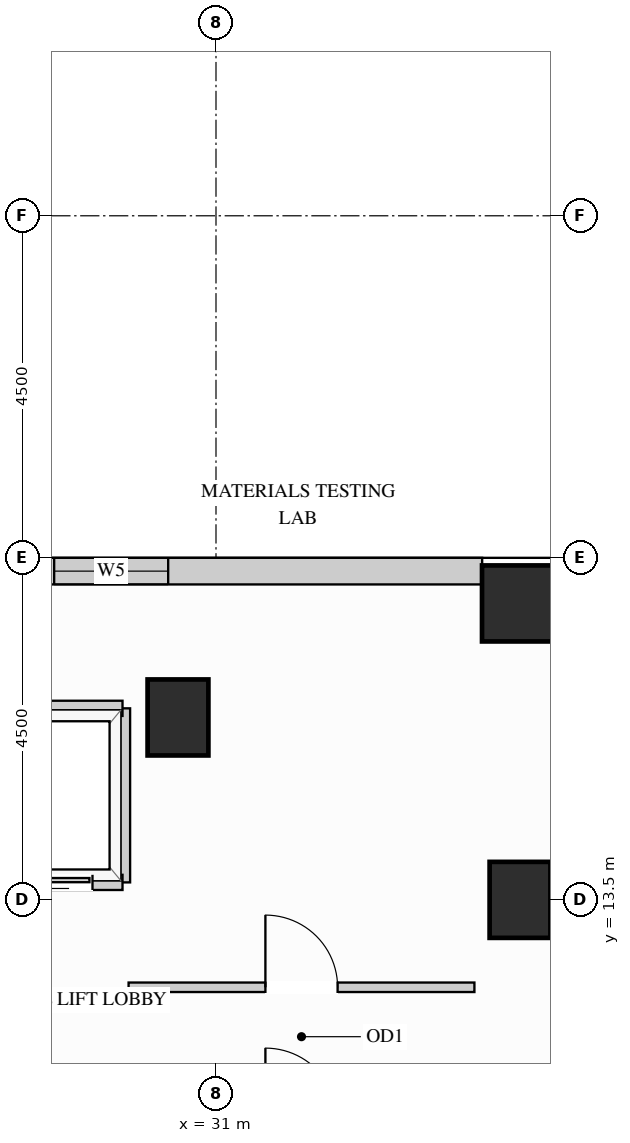
"""IFC4 building model, lengths in metres.
Left out: names, types, materials, properties, quantities, classifications, styles, units other than length and angle.
Written with IfcOpenShell. Run it as: python <this file> out.ifc"""

import sys

from ifc_helpers import new_model, si_unit, direction, frame, frame_2d, origin, origin_2d, place, context, subcontext, project, spatial, rectangle, extrude, source, transform, mapped, element, fill, save


model = new_model("IFC4")
c1 = context("Model", 3, precision=1e-05, world=origin(), true_north=direction((0.0, 1.0)))
c2 = subcontext(c1, "Body", "Model", "MODEL_VIEW")
j1 = project(units=[si_unit("LENGTHUNIT", "METRE"), si_unit("PLANEANGLEUNIT", "RADIAN")], contexts=[c1])
p1 = place(None, origin())
s1 = spatial("IfcSite", under=j1, at=p1, CompositionType="ELEMENT")
p2 = place(p1, origin())
s2 = spatial("IfcBuilding", under=s1, at=p2, CompositionType="ELEMENT")
p3 = place(p2, frame((0.0, 0.0, 186.3)))
s3 = spatial("IfcBuildingStorey", under=s2, at=p3, CompositionType="ELEMENT", Elevation=186.3)
m1 = source(origin(), c2, "Body", "SweptSolid", [
    extrude(rectangle(XDim=0.8, YDim=1.0, at=origin_2d()), origin(), (0.0, 0.0, 1.0), 3.4),
])
for number, where, z_axis, x_axis in (
    (1, (35.0, 13.5, 0.0), (0.0, 0.0, 1.0), (1.0, 0.0, 0.0)),
    (2, (30.5, 15.9, 0.0), (0.0, 0.0, 1.0), (1.0, 0.0, 0.0)),
):
    element("IfcColumn", number, at=place(p3, frame(where, z_axis=z_axis, x_axis=x_axis)), inside=s3, PredefinedType="COLUMN", context=c2, shape_type="MappedRepresentation", body=[
        mapped(m1, transform((0.0, 0.0, 0.0), x_axis=(1.0, 0.0, 0.0), y_axis=(0.0, 1.0, 0.0), z_axis=(0.0, 0.0, 1.0))),
    ])
m2 = source(origin(), c2, "Body", "SweptSolid", [
    extrude(rectangle(XDim=1.0, YDim=1.0, at=origin_2d()), origin(), (0.0, 0.0, 1.0), 3.4),
])
p4 = place(p3, frame((35.0, 17.4, 0.0), z_axis=(0.0, 0.0, 1.0), x_axis=(1.0, 0.0, 0.0)))
e3 = element("IfcColumn", 3, at=p4, inside=s3, PredefinedType="COLUMN", context=c2, shape_type="MappedRepresentation", body=[
    mapped(m2, transform((0.0, 0.0, 0.0), x_axis=(1.0, 0.0, 0.0), y_axis=(0.0, 1.0, 0.0), z_axis=(0.0, 0.0, 1.0))),
])
p5 = place(p3, frame((34.502, 17.825, 0.0), z_axis=(0.0, 0.0, 1.0), x_axis=(-1.0, 0.0, 0.0)))
e4 = element("IfcWall", 4, at=p5, inside=s3, PredefinedType="SOLIDWALL", context=c2, shape_type="SweptSolid", body=[
    extrude(rectangle(XDim=15.104, YDim=0.35, at=frame_2d((7.552, 0.0))), origin(), (0.0, 0.0, 1.0), 3.385),
])
p6 = place(p5, frame((4.131, 0.0, 0.78)))
e5 = element("IfcOpeningElement", 5, at=p6, cuts=e4, PredefinedType="OPENING", context=c2, shape_type="SweptSolid", body=[
    extrude(rectangle(XDim=1.5, YDim=2.0, at=frame_2d((0.75, 1.0))), frame((0.0, 0.185, 0.0), z_axis=(0.0, -1.0, 0.0), x_axis=(1.0, 0.0, 0.0)), (0.0, 0.0, 1.0), 0.37),
])
p7 = place(p5, frame((9.442, 0.0, 0.78)))
e6 = element("IfcOpeningElement", 6, at=p7, cuts=e4, PredefinedType="OPENING", context=c2, shape_type="SweptSolid", body=[
    extrude(rectangle(XDim=1.5, YDim=2.0, at=frame_2d((0.75, 1.0))), frame((0.0, 0.185, 0.0), z_axis=(0.0, -1.0, 0.0), x_axis=(1.0, 0.0, 0.0)), (0.0, 0.0, 1.0), 0.37),
])
p8 = place(p3, frame((29.85, 12.35, 0.0), z_axis=(0.0, 0.0, 1.0), x_axis=(1.0, 0.0, 0.0)))
e7 = element("IfcWall", 7, at=p8, inside=s3, PredefinedType="PARTITIONING", context=c2, shape_type="SweptSolid", body=[
    extrude(rectangle(XDim=4.55, YDim=0.125, at=frame_2d((2.275, 0.0))), origin(), (0.0, 0.0, 1.0), 3.385),
])
p9 = place(p8, frame((1.8, 0.0, 0.0)))
e8 = element("IfcOpeningElement", 8, at=p9, cuts=e7, PredefinedType="OPENING", context=c2, shape_type="SweptSolid", body=[
    extrude(rectangle(XDim=0.95, YDim=2.15, at=frame_2d((0.475, 1.075))), frame((0.0, 0.073, 0.0), z_axis=(0.0, -1.0, 0.0), x_axis=(1.0, 0.0, 0.0)), (0.0, 0.0, 1.0), 0.145),
])
m3 = source(origin(), c2, "Body", "SweptSolid", [
    extrude(rectangle(XDim=2.29, YDim=0.2, at=frame_2d((1.145, 0.0))), origin(), (0.0, 0.0, 1.0), 3.385),
])
p10 = place(p3, frame((29.77, 13.73, 0.0), z_axis=(0.0, 0.0, 1.0), x_axis=(0.0, 1.0, 0.0)))
e9 = element("IfcWall", 9, at=p10, inside=s3, PredefinedType="PARTITIONING", context=c2, shape_type="MappedRepresentation", body=[
    mapped(m3, transform((0.0, 0.0, 0.0), x_axis=(1.0, 0.0, 0.0), y_axis=(0.0, 1.0, 0.0), z_axis=(0.0, 0.0, 1.0))),
])
m4 = source(origin(), c2, "Body", "SweptSolid", [
    extrude(rectangle(XDim=1.89, YDim=0.2, at=frame_2d((0.945, 0.0))), origin(), (0.0, 0.0, 1.0), 2.773),
])
p11 = place(p3, frame((27.88, 16.02, 0.0), z_axis=(0.0, 0.0, 1.0), x_axis=(1.0, 0.0, 0.0)))
e10 = element("IfcWall", 10, at=p11, inside=s3, PredefinedType="PARTITIONING", context=c2, shape_type="MappedRepresentation", body=[
    mapped(m4, transform((0.0, 0.0, 0.0), x_axis=(1.0, 0.0, 0.0), y_axis=(0.0, 1.0, 0.0), z_axis=(0.0, 0.0, 1.0))),
])
p12 = place(p3, frame((27.88, 13.73, 0.0), z_axis=(0.0, 0.0, 1.0), x_axis=(1.0, 0.0, 0.0)))
e11 = element("IfcWall", 11, at=p12, inside=s3, PredefinedType="PARTITIONING", context=c2, shape_type="SweptSolid", body=[
    extrude(rectangle(XDim=1.89, YDim=0.2, at=frame_2d((0.945, 0.0))), origin(), (0.0, 0.0, 1.0), 2.466),
])
p13 = place(p12, frame((0.395, 0.0, 0.0)))
e12 = element("IfcOpeningElement", 12, at=p13, cuts=e11, PredefinedType="OPENING", context=c2, shape_type="SweptSolid", body=[
    extrude(rectangle(XDim=1.1, YDim=2.2, at=frame_2d((0.55, 1.1))), frame((0.0, 0.11, 0.0), z_axis=(0.0, -1.0, 0.0), x_axis=(1.0, 0.0, 0.0)), (0.0, 0.0, 1.0), 0.22),
])
m5 = source(origin(), c2, "Body", "SweptSolid", [
    extrude(rectangle(XDim=1.1, YDim=2.2, at=frame_2d((0.55, 1.1))), frame((0.0, 0.025, 0.0), z_axis=(0.0, -1.0, 0.0), x_axis=(1.0, 0.0, 0.0)), (0.0, 0.0, 1.0), 0.05),
])
p14 = place(p13, origin())
e13 = element("IfcDoor", 13, at=p14, inside=s3, OperationType="SLIDING_TO_LEFT", PredefinedType="DOOR", context=c2, shape_type="MappedRepresentation", body=[
    mapped(m5, transform((0.0, 0.0, 0.0), x_axis=(1.0, 0.0, 0.0), y_axis=(0.0, 1.0, 0.0), z_axis=(0.0, 0.0, 1.0))),
])
fill(e12, e13)
m6 = source(origin(), c2, "Body", "SweptSolid", [
    extrude(rectangle(XDim=0.95, YDim=2.15, at=frame_2d((0.475, 1.075))), frame((0.0, 0.025, 0.0), z_axis=(0.0, -1.0, 0.0), x_axis=(1.0, 0.0, 0.0)), (0.0, 0.0, 1.0), 0.05),
])
p15 = place(p9, origin())
e14 = element("IfcDoor", 14, at=p15, inside=s3, OperationType="SINGLE_SWING_LEFT", PredefinedType="DOOR", context=c2, shape_type="MappedRepresentation", body=[
    mapped(m6, transform((0.0, 0.0, 0.0), x_axis=(1.0, 0.0, 0.0), y_axis=(0.0, 1.0, 0.0), z_axis=(0.0, 0.0, 1.0))),
])
fill(e8, e14)
m7 = source(origin(), c2, "Body", "SweptSolid", [
    extrude(rectangle(XDim=1.5, YDim=2.0, at=frame_2d((0.75, 1.0))), frame((0.0, 0.03, 0.0), z_axis=(0.0, -1.0, 0.0), x_axis=(1.0, 0.0, 0.0)), (0.0, 0.0, 1.0), 0.06),
])
p16 = place(p6, origin())
e15 = element("IfcWindow", 15, at=p16, inside=s3, PartitioningType="SINGLE_PANEL", PredefinedType="WINDOW", context=c2, shape_type="MappedRepresentation", body=[
    mapped(m7, transform((0.0, 0.0, 0.0), x_axis=(1.0, 0.0, 0.0), y_axis=(0.0, 1.0, 0.0), z_axis=(0.0, 0.0, 1.0))),
])
fill(e5, e15)
save(model, sys.argv[1])
